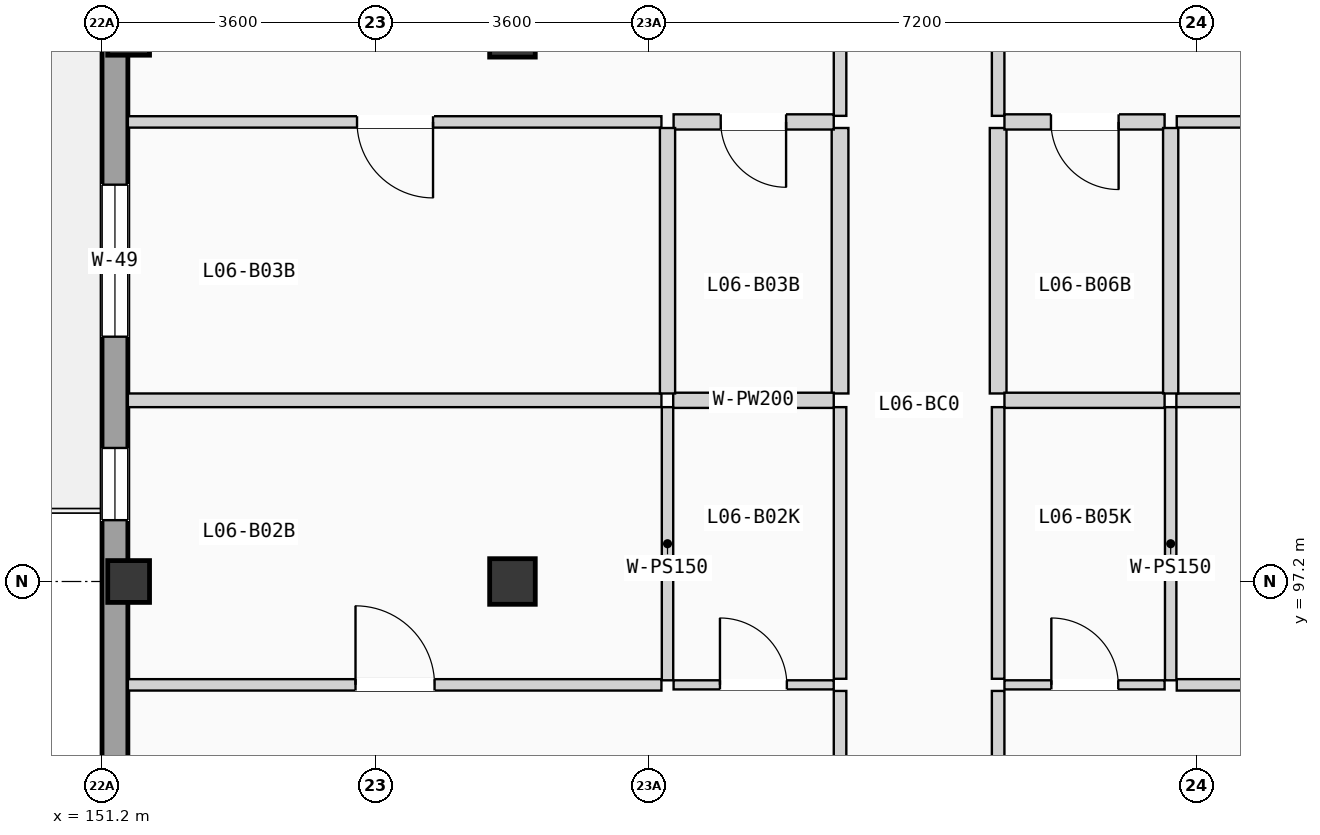
"""IFC4 building model, lengths in metres.
Left out: names, types, materials, properties, quantities, classifications, styles, units other than length and angle.
Written with IfcOpenShell. Run it as: python <this file> out.ifc"""

import sys

from ifc_helpers import new_model, si_unit, direction, frame, frame_2d, origin, origin_2d, place, context, subcontext, project, spatial, rectangle, extrude, element, fill, save


model = new_model("IFC4")
c1 = context("Model", 3, precision=1e-05, world=origin(), true_north=direction((0.0, 1.0)))
c2 = subcontext(c1, "Body", "Model", "MODEL_VIEW")
j1 = project(units=[si_unit("LENGTHUNIT", "METRE"), si_unit("PLANEANGLEUNIT", "RADIAN")], contexts=[c1])
p1 = place(None, origin())
s1 = spatial("IfcSite", under=j1, at=p1, CompositionType="ELEMENT")
p2 = place(p1, origin())
s2 = spatial("IfcBuilding", under=s1, at=p2, CompositionType="ELEMENT")
p3 = place(p2, frame((0.0, 0.0, 21.525)))
s3 = spatial("IfcBuildingStorey", under=s2, at=p3, CompositionType="ELEMENT", Elevation=21.525)
for number, where, z_axis, x_axis in (
    (1, (151.55, 97.2, 0.0), (0.0, 0.0, 1.0), (1.0, 0.0, 0.0)),
    (2, (151.55, 104.4, 0.0), (0.0, 0.0, 1.0), (1.0, 0.0, 0.0)),
):
    element("IfcColumn", number, at=place(p3, frame(where, z_axis=z_axis, x_axis=x_axis)), inside=s3, PredefinedType="COLUMN", context=c2, shape_type="SweptSolid", body=[
        extrude(rectangle(XDim=0.55, YDim=0.55, at=origin_2d()), origin(), (0.0, 0.0, 1.0), 3.15),
    ])
for number, where, z_axis, x_axis in (
    (3, (156.6, 97.2, 0.0), (0.0, 0.0, 1.0), (1.0, 0.0, 0.0)),
    (4, (156.6, 104.4, 0.0), (0.0, 0.0, 1.0), (1.0, 0.0, 0.0)),
):
    element("IfcColumn", number, at=place(p3, frame(where, z_axis=z_axis, x_axis=x_axis)), inside=s3, PredefinedType="COLUMN", context=c2, shape_type="SweptSolid", body=[
        extrude(rectangle(XDim=0.6, YDim=0.6, at=origin_2d()), origin(), (0.0, 0.0, 1.0), 3.15),
    ])
p4 = place(p3, frame((151.37, 68.74, 0.0), z_axis=(0.0, 0.0, 1.0), x_axis=(0.0, 1.0, 0.0)))
e5 = element("IfcWall", 5, at=p4, inside=s3, PredefinedType="SOLIDWALL", context=c2, shape_type="SweptSolid", body=[
    extrude(rectangle(XDim=49.72, YDim=0.34, at=frame_2d((24.86, 0.0))), origin(), (0.0, 0.0, 1.0), 2.89),
])
p5 = place(p4, frame((11.462, 0.0, 0.0)))
e6 = element("IfcOpeningElement", 6, at=p5, cuts=e5, PredefinedType="OPENING", context=c2, shape_type="SweptSolid", body=[
    extrude(rectangle(XDim=0.95, YDim=2.15, at=frame_2d((0.475, 1.075))), frame((0.0, 0.18, 0.0), z_axis=(0.0, -1.0, 0.0), x_axis=(1.0, 0.0, 0.0)), (0.0, 0.0, 1.0), 0.36),
])
p6 = place(p4, frame((8.082, 0.0, 0.555)))
e7 = element("IfcOpeningElement", 7, at=p6, cuts=e5, PredefinedType="OPENING", context=c2, shape_type="SweptSolid", body=[
    extrude(rectangle(XDim=1.85, YDim=1.65, at=frame_2d((0.925, 0.825))), frame((0.0, 0.18, 0.0), z_axis=(0.0, -1.0, 0.0), x_axis=(1.0, 0.0, 0.0)), (0.0, 0.0, 1.0), 0.36),
])
p7 = place(p4, frame((16.565, 0.0, 0.85)))
e8 = element("IfcOpeningElement", 8, at=p7, cuts=e5, PredefinedType="OPENING", context=c2, shape_type="SweptSolid", body=[
    extrude(rectangle(XDim=0.95, YDim=1.2, at=frame_2d((0.475, 0.6))), frame((0.0, 0.18, 0.0), z_axis=(0.0, -1.0, 0.0), x_axis=(1.0, 0.0, 0.0)), (0.0, 0.0, 1.0), 0.36),
])
p8 = place(p4, frame((23.86, 0.0, 0.9)))
e9 = element("IfcOpeningElement", 9, at=p8, cuts=e5, PredefinedType="OPENING", context=c2, shape_type="SweptSolid", body=[
    extrude(rectangle(XDim=2.0, YDim=1.2, at=frame_2d((1.0, 0.6))), frame((0.0, 0.18, 0.0), z_axis=(0.0, -1.0, 0.0), x_axis=(1.0, 0.0, 0.0)), (0.0, 0.0, 1.0), 0.36),
])
p9 = place(p4, frame((19.503, 0.0, 0.85)))
e10 = element("IfcOpeningElement", 10, at=p9, cuts=e5, PredefinedType="OPENING", context=c2, shape_type="SweptSolid", body=[
    extrude(rectangle(XDim=0.95, YDim=1.2, at=frame_2d((0.475, 0.6))), frame((0.0, 0.18, 0.0), z_axis=(0.0, -1.0, 0.0), x_axis=(1.0, 0.0, 0.0)), (0.0, 0.0, 1.0), 0.36),
])
p10 = place(p4, frame((29.267, 0.0, 0.85)))
e11 = element("IfcOpeningElement", 11, at=p10, cuts=e5, PredefinedType="OPENING", context=c2, shape_type="SweptSolid", body=[
    extrude(rectangle(XDim=0.95, YDim=1.2, at=frame_2d((0.475, 0.6))), frame((0.0, 0.18, 0.0), z_axis=(0.0, -1.0, 0.0), x_axis=(1.0, 0.0, 0.0)), (0.0, 0.0, 1.0), 0.36),
])
p11 = place(p4, frame((37.243, 0.0, 0.0)))
e12 = element("IfcOpeningElement", 12, at=p11, cuts=e5, PredefinedType="OPENING", context=c2, shape_type="SweptSolid", body=[
    extrude(rectangle(XDim=1.08, YDim=2.18, at=frame_2d((0.54, 1.09))), frame((0.0, 0.18, 0.0), z_axis=(0.0, -1.0, 0.0), x_axis=(1.0, 0.0, 0.0)), (0.0, 0.0, 1.0), 0.36),
])
p12 = place(p4, frame((31.681, 0.0, 0.555)))
e13 = element("IfcOpeningElement", 13, at=p12, cuts=e5, PredefinedType="OPENING", context=c2, shape_type="SweptSolid", body=[
    extrude(rectangle(XDim=2.0, YDim=1.65, at=frame_2d((1.0, 0.825))), frame((0.0, 0.18, 0.0), z_axis=(0.0, -1.0, 0.0), x_axis=(1.0, 0.0, 0.0)), (0.0, 0.0, 1.0), 0.36),
])
p13 = place(p4, frame((40.239, 0.0, 0.85)))
e14 = element("IfcOpeningElement", 14, at=p13, cuts=e5, PredefinedType="OPENING", context=c2, shape_type="SweptSolid", body=[
    extrude(rectangle(XDim=0.95, YDim=1.2, at=frame_2d((0.475, 0.6))), frame((0.0, 0.18, 0.0), z_axis=(0.0, -1.0, 0.0), x_axis=(1.0, 0.0, 0.0)), (0.0, 0.0, 1.0), 0.36),
])
p14 = place(p3, frame((160.91, 91.44, 0.0), z_axis=(0.0, 0.0, 1.0), x_axis=(0.0, 1.0, 0.0)))
e15 = element("IfcWall", 15, at=p14, inside=s3, PredefinedType="PARTITIONING", context=c2, shape_type="SweptSolid", body=[
    extrude(rectangle(XDim=4.32, YDim=0.165, at=frame_2d((2.16, 0.0))), origin(), (0.0, 0.0, 1.0), 2.87),
])
p15 = place(p14, frame((1.655, 0.0, 0.0)))
e16 = element("IfcOpeningElement", 16, at=p15, cuts=e15, PredefinedType="OPENING", context=c2, shape_type="SweptSolid", body=[
    extrude(rectangle(XDim=1.01, YDim=2.11, at=frame_2d((0.505, 1.055))), frame((0.0, 0.093, 0.0), z_axis=(0.0, -1.0, 0.0), x_axis=(1.0, 0.0, 0.0)), (0.0, 0.0, 1.0), 0.185),
])
p16 = place(p3, frame((160.91, 95.92, 0.0), z_axis=(0.0, 0.0, 1.0), x_axis=(0.0, 1.0, 0.0)))
e17 = element("IfcWall", 17, at=p16, inside=s3, PredefinedType="PARTITIONING", context=c2, shape_type="SweptSolid", body=[
    extrude(rectangle(XDim=3.574, YDim=0.165, at=frame_2d((1.787, 0.0))), origin(), (0.0, 0.0, 1.0), 2.87),
])
p17 = place(p3, frame((160.91, 103.327, 0.0), z_axis=(0.0, 0.0, 1.0), x_axis=(0.0, 1.0, 0.0)))
e18 = element("IfcWall", 18, at=p17, inside=s3, PredefinedType="PARTITIONING", context=c2, shape_type="SweptSolid", body=[
    extrude(rectangle(XDim=4.22, YDim=0.165, at=frame_2d((2.11, 0.0))), origin(), (0.0, 0.0, 1.0), 2.87),
])
p18 = place(p17, frame((1.605, 0.0, 0.0)))
e19 = element("IfcOpeningElement", 19, at=p18, cuts=e18, PredefinedType="OPENING", context=c2, shape_type="SweptSolid", body=[
    extrude(rectangle(XDim=1.01, YDim=2.11, at=frame_2d((0.505, 1.055))), frame((0.0, 0.093, 0.0), z_axis=(0.0, -1.0, 0.0), x_axis=(1.0, 0.0, 0.0)), (0.0, 0.0, 1.0), 0.185),
])
p19 = place(p3, frame((160.91, 99.674, 0.0), z_axis=(0.0, 0.0, 1.0), x_axis=(0.0, 1.0, 0.0)))
e20 = element("IfcWall", 20, at=p19, inside=s3, PredefinedType="PLUMBINGWALL", context=c2, shape_type="SweptSolid", body=[
    extrude(rectangle(XDim=3.493, YDim=0.22, at=frame_2d((1.747, 0.0))), origin(), (0.0, 0.0, 1.0), 2.87),
])
p20 = place(p3, frame((162.99, 91.44, 0.0), z_axis=(0.0, 0.0, 1.0), x_axis=(0.0, 1.0, 0.0)))
e21 = element("IfcWall", 21, at=p20, inside=s3, PredefinedType="PARTITIONING", context=c2, shape_type="SweptSolid", body=[
    extrude(rectangle(XDim=4.32, YDim=0.165, at=frame_2d((2.16, 0.0))), origin(), (0.0, 0.0, 1.0), 2.87),
])
p21 = place(p20, frame((1.655, 0.0, 0.0)))
e22 = element("IfcOpeningElement", 22, at=p21, cuts=e21, PredefinedType="OPENING", context=c2, shape_type="SweptSolid", body=[
    extrude(rectangle(XDim=1.01, YDim=2.11, at=frame_2d((0.505, 1.055))), frame((0.0, 0.093, 0.0), z_axis=(0.0, -1.0, 0.0), x_axis=(1.0, 0.0, 0.0)), (0.0, 0.0, 1.0), 0.185),
])
p22 = place(p3, frame((162.99, 95.92, 0.0), z_axis=(0.0, 0.0, 1.0), x_axis=(0.0, 1.0, 0.0)))
e23 = element("IfcWall", 23, at=p22, inside=s3, PredefinedType="PARTITIONING", context=c2, shape_type="SweptSolid", body=[
    extrude(rectangle(XDim=3.574, YDim=0.165, at=frame_2d((1.787, 0.0))), origin(), (0.0, 0.0, 1.0), 2.87),
])
p23 = place(p3, frame((162.99, 103.327, 0.0), z_axis=(0.0, 0.0, 1.0), x_axis=(0.0, 1.0, 0.0)))
e24 = element("IfcWall", 24, at=p23, inside=s3, PredefinedType="PARTITIONING", context=c2, shape_type="SweptSolid", body=[
    extrude(rectangle(XDim=4.22, YDim=0.165, at=frame_2d((2.11, 0.0))), origin(), (0.0, 0.0, 1.0), 2.87),
])
p24 = place(p23, frame((1.605, 0.0, 0.0)))
e25 = element("IfcOpeningElement", 25, at=p24, cuts=e24, PredefinedType="OPENING", context=c2, shape_type="SweptSolid", body=[
    extrude(rectangle(XDim=1.01, YDim=2.11, at=frame_2d((0.505, 1.055))), frame((0.0, 0.093, 0.0), z_axis=(0.0, -1.0, 0.0), x_axis=(1.0, 0.0, 0.0)), (0.0, 0.0, 1.0), 0.185),
])
p25 = place(p3, frame((162.99, 99.674, 0.0), z_axis=(0.0, 0.0, 1.0), x_axis=(0.0, 1.0, 0.0)))
e26 = element("IfcWall", 26, at=p25, inside=s3, PredefinedType="PLUMBINGWALL", context=c2, shape_type="SweptSolid", body=[
    extrude(rectangle(XDim=3.493, YDim=0.22, at=frame_2d((1.747, 0.0))), origin(), (0.0, 0.0, 1.0), 2.87),
])
p26 = place(p3, frame((158.72, 95.84, 0.0), z_axis=(0.0, 0.0, 1.0), x_axis=(1.0, 0.0, 0.0)))
e27 = element("IfcWall", 27, at=p26, inside=s3, PredefinedType="PARTITIONING", context=c2, shape_type="SweptSolid", body=[
    extrude(rectangle(XDim=2.107, YDim=0.12, at=frame_2d((1.053, 0.0))), origin(), (0.0, 0.0, 1.0), 2.87),
])
p27 = place(p26, frame((0.61, 0.0, 0.0)))
e28 = element("IfcOpeningElement", 28, at=p27, cuts=e27, PredefinedType="OPENING", context=c2, shape_type="SweptSolid", body=[
    extrude(rectangle(XDim=0.88, YDim=2.02, at=frame_2d((0.44, 1.01))), frame((0.0, 0.07, 0.0), z_axis=(0.0, -1.0, 0.0), x_axis=(1.0, 0.0, 0.0)), (0.0, 0.0, 1.0), 0.14),
])
p28 = place(p3, frame((151.54, 95.84, 0.0), z_axis=(0.0, 0.0, 1.0), x_axis=(1.0, 0.0, 0.0)))
e29 = element("IfcWall", 29, at=p28, inside=s3, PredefinedType="PARTITIONING", context=c2, shape_type="SweptSolid", body=[
    extrude(rectangle(XDim=7.02, YDim=0.15, at=frame_2d((3.51, 0.0))), origin(), (0.0, 0.0, 1.0), 2.87),
])
p29 = place(p28, frame((2.995, 0.0, 0.0)))
e30 = element("IfcOpeningElement", 30, at=p29, cuts=e29, PredefinedType="OPENING", context=c2, shape_type="SweptSolid", body=[
    extrude(rectangle(XDim=1.04, YDim=2.08, at=frame_2d((0.52, 1.04))), frame((0.0, 0.085, 0.0), z_axis=(0.0, -1.0, 0.0), x_axis=(1.0, 0.0, 0.0)), (0.0, 0.0, 1.0), 0.17),
])
p30 = place(p3, frame((158.64, 95.9, 0.0), z_axis=(0.0, 0.0, 1.0), x_axis=(0.0, 1.0, 0.0)))
e31 = element("IfcWall", 31, at=p30, inside=s3, PredefinedType="PARTITIONING", context=c2, shape_type="SweptSolid", body=[
    extrude(rectangle(XDim=3.594, YDim=0.15, at=frame_2d((1.797, 0.0))), origin(), (0.0, 0.0, 1.0), 2.87),
])
p31 = place(p3, frame((158.715, 99.584, 0.0), z_axis=(0.0, 0.0, 1.0), x_axis=(1.0, 0.0, 0.0)))
e32 = element("IfcWall", 32, at=p31, inside=s3, PredefinedType="PLUMBINGWALL", context=c2, shape_type="SweptSolid", body=[
    extrude(rectangle(XDim=2.112, YDim=0.2, at=frame_2d((1.056, 0.0))), origin(), (0.0, 0.0, 1.0), 2.87),
])
p32 = place(p3, frame((151.54, 99.584, 0.0), z_axis=(0.0, 0.0, 1.0), x_axis=(1.0, 0.0, 0.0)))
e33 = element("IfcWall", 33, at=p32, inside=s3, PredefinedType="PARTITIONING", context=c2, shape_type="SweptSolid", body=[
    extrude(rectangle(XDim=7.02, YDim=0.18, at=frame_2d((3.51, 0.0))), origin(), (0.0, 0.0, 1.0), 2.87),
])
p33 = place(p3, frame((158.72, 103.247, 0.0), z_axis=(0.0, 0.0, 1.0), x_axis=(1.0, 0.0, 0.0)))
e34 = element("IfcWall", 34, at=p33, inside=s3, PredefinedType="PLUMBINGWALL", context=c2, shape_type="SweptSolid", body=[
    extrude(rectangle(XDim=2.107, YDim=0.2, at=frame_2d((1.053, 0.0))), origin(), (0.0, 0.0, 1.0), 2.87),
])
p34 = place(p33, frame((0.62, 0.0, 0.0)))
e35 = element("IfcOpeningElement", 35, at=p34, cuts=e34, PredefinedType="OPENING", context=c2, shape_type="SweptSolid", body=[
    extrude(rectangle(XDim=0.86, YDim=2.0, at=frame_2d((0.43, 1.0))), frame((0.0, 0.11, 0.0), z_axis=(0.0, -1.0, 0.0), x_axis=(1.0, 0.0, 0.0)), (0.0, 0.0, 1.0), 0.22),
])
p35 = place(p3, frame((151.54, 103.247, 0.0), z_axis=(0.0, 0.0, 1.0), x_axis=(1.0, 0.0, 0.0)))
e36 = element("IfcWall", 36, at=p35, inside=s3, PredefinedType="PARTITIONING", context=c2, shape_type="SweptSolid", body=[
    extrude(rectangle(XDim=7.02, YDim=0.15, at=frame_2d((3.51, 0.0))), origin(), (0.0, 0.0, 1.0), 2.87),
])
p36 = place(p35, frame((3.015, 0.0, 0.0)))
e37 = element("IfcOpeningElement", 37, at=p36, cuts=e36, PredefinedType="OPENING", context=c2, shape_type="SweptSolid", body=[
    extrude(rectangle(XDim=1.0, YDim=2.06, at=frame_2d((0.5, 1.03))), frame((0.0, 0.085, 0.0), z_axis=(0.0, -1.0, 0.0), x_axis=(1.0, 0.0, 0.0)), (0.0, 0.0, 1.0), 0.17),
])
p37 = place(p3, frame((158.64, 99.674, 0.0), z_axis=(0.0, 0.0, 1.0), x_axis=(0.0, 1.0, 0.0)))
e38 = element("IfcWall", 38, at=p37, inside=s3, PredefinedType="PLUMBINGWALL", context=c2, shape_type="SweptSolid", body=[
    extrude(rectangle(XDim=3.493, YDim=0.2, at=frame_2d((1.747, 0.0))), origin(), (0.0, 0.0, 1.0), 2.87),
])
p38 = place(p3, frame((163.073, 95.84, 0.0), z_axis=(0.0, 0.0, 1.0), x_axis=(1.0, 0.0, 0.0)))
e39 = element("IfcWall", 39, at=p38, inside=s3, PredefinedType="PARTITIONING", context=c2, shape_type="SweptSolid", body=[
    extrude(rectangle(XDim=2.107, YDim=0.12, at=frame_2d((1.053, 0.0))), origin(), (0.0, 0.0, 1.0), 2.87),
])
p39 = place(p38, frame((0.617, 0.0, 0.0)))
e40 = element("IfcOpeningElement", 40, at=p39, cuts=e39, PredefinedType="OPENING", context=c2, shape_type="SweptSolid", body=[
    extrude(rectangle(XDim=0.88, YDim=2.02, at=frame_2d((0.44, 1.01))), frame((0.0, 0.07, 0.0), z_axis=(0.0, -1.0, 0.0), x_axis=(1.0, 0.0, 0.0)), (0.0, 0.0, 1.0), 0.14),
])
p40 = place(p3, frame((165.34, 95.84, 0.0), z_axis=(0.0, 0.0, 1.0), x_axis=(1.0, 0.0, 0.0)))
e41 = element("IfcWall", 41, at=p40, inside=s3, PredefinedType="PARTITIONING", context=c2, shape_type="SweptSolid", body=[
    extrude(rectangle(XDim=7.12, YDim=0.15, at=frame_2d((3.56, 0.0))), origin(), (0.0, 0.0, 1.0), 2.87),
])
p41 = place(p40, frame((3.035, 0.0, 0.0)))
e42 = element("IfcOpeningElement", 42, at=p41, cuts=e41, PredefinedType="OPENING", context=c2, shape_type="SweptSolid", body=[
    extrude(rectangle(XDim=1.04, YDim=2.08, at=frame_2d((0.52, 1.04))), frame((0.0, 0.085, 0.0), z_axis=(0.0, -1.0, 0.0), x_axis=(1.0, 0.0, 0.0)), (0.0, 0.0, 1.0), 0.17),
])
p42 = place(p3, frame((165.26, 95.9, 0.0), z_axis=(0.0, 0.0, 1.0), x_axis=(0.0, 1.0, 0.0)))
e43 = element("IfcWall", 43, at=p42, inside=s3, PredefinedType="PARTITIONING", context=c2, shape_type="SweptSolid", body=[
    extrude(rectangle(XDim=3.594, YDim=0.15, at=frame_2d((1.797, 0.0))), origin(), (0.0, 0.0, 1.0), 2.87),
])
p43 = place(p3, frame((163.073, 99.584, 0.0), z_axis=(0.0, 0.0, 1.0), x_axis=(1.0, 0.0, 0.0)))
e44 = element("IfcWall", 44, at=p43, inside=s3, PredefinedType="PLUMBINGWALL", context=c2, shape_type="SweptSolid", body=[
    extrude(rectangle(XDim=2.107, YDim=0.2, at=frame_2d((1.053, 0.0))), origin(), (0.0, 0.0, 1.0), 2.87),
])
p44 = place(p3, frame((165.335, 99.584, 0.0), z_axis=(0.0, 0.0, 1.0), x_axis=(1.0, 0.0, 0.0)))
e45 = element("IfcWall", 45, at=p44, inside=s3, PredefinedType="PARTITIONING", context=c2, shape_type="SweptSolid", body=[
    extrude(rectangle(XDim=7.125, YDim=0.18, at=frame_2d((3.562, 0.0))), origin(), (0.0, 0.0, 1.0), 2.87),
])
p45 = place(p3, frame((163.073, 103.247, 0.0), z_axis=(0.0, 0.0, 1.0), x_axis=(1.0, 0.0, 0.0)))
e46 = element("IfcWall", 46, at=p45, inside=s3, PredefinedType="PLUMBINGWALL", context=c2, shape_type="SweptSolid", body=[
    extrude(rectangle(XDim=2.107, YDim=0.2, at=frame_2d((1.053, 0.0))), origin(), (0.0, 0.0, 1.0), 2.87),
])
p46 = place(p45, frame((0.612, 0.0, 0.0)))
e47 = element("IfcOpeningElement", 47, at=p46, cuts=e46, PredefinedType="OPENING", context=c2, shape_type="SweptSolid", body=[
    extrude(rectangle(XDim=0.89, YDim=2.03, at=frame_2d((0.445, 1.015))), frame((0.0, 0.11, 0.0), z_axis=(0.0, -1.0, 0.0), x_axis=(1.0, 0.0, 0.0)), (0.0, 0.0, 1.0), 0.22),
])
p47 = place(p3, frame((165.34, 103.247, 0.0), z_axis=(0.0, 0.0, 1.0), x_axis=(1.0, 0.0, 0.0)))
e48 = element("IfcWall", 48, at=p47, inside=s3, PredefinedType="PARTITIONING", context=c2, shape_type="SweptSolid", body=[
    extrude(rectangle(XDim=7.12, YDim=0.15, at=frame_2d((3.56, 0.0))), origin(), (0.0, 0.0, 1.0), 2.87),
])
p48 = place(p47, frame((3.055, 0.0, 0.0)))
e49 = element("IfcOpeningElement", 49, at=p48, cuts=e48, PredefinedType="OPENING", context=c2, shape_type="SweptSolid", body=[
    extrude(rectangle(XDim=1.0, YDim=2.06, at=frame_2d((0.5, 1.03))), frame((0.0, 0.085, 0.0), z_axis=(0.0, -1.0, 0.0), x_axis=(1.0, 0.0, 0.0)), (0.0, 0.0, 1.0), 0.17),
])
p49 = place(p3, frame((165.26, 99.674, 0.0), z_axis=(0.0, 0.0, 1.0), x_axis=(0.0, 1.0, 0.0)))
e50 = element("IfcWall", 50, at=p49, inside=s3, PredefinedType="PLUMBINGWALL", context=c2, shape_type="SweptSolid", body=[
    extrude(rectangle(XDim=3.493, YDim=0.2, at=frame_2d((1.747, 0.0))), origin(), (0.0, 0.0, 1.0), 2.87),
])
p50 = place(p10, origin())
e51 = element("IfcWindow", 51, at=p50, inside=s3, PartitioningType="SINGLE_PANEL", PredefinedType="WINDOW", context=c2, shape_type="SweptSolid", body=[
    extrude(rectangle(XDim=0.95, YDim=1.2, at=frame_2d((0.475, 0.6))), frame((0.0, 0.03, 0.0), z_axis=(0.0, -1.0, 0.0), x_axis=(1.0, 0.0, 0.0)), (0.0, 0.0, 1.0), 0.06),
])
fill(e11, e51)
p51 = place(p12, origin())
e52 = element("IfcWindow", 52, at=p51, inside=s3, PartitioningType="DOUBLE_PANEL_VERTICAL", PredefinedType="WINDOW", context=c2, shape_type="SweptSolid", body=[
    extrude(rectangle(XDim=2.0, YDim=1.65, at=frame_2d((1.0, 0.825))), frame((0.0, 0.03, 0.0), z_axis=(0.0, -1.0, 0.0), x_axis=(1.0, 0.0, 0.0)), (0.0, 0.0, 1.0), 0.06),
])
fill(e13, e52)
p52 = place(p27, origin())
e53 = element("IfcDoor", 53, at=p52, inside=s3, OperationType="SINGLE_SWING_LEFT", PredefinedType="DOOR", context=c2, shape_type="SweptSolid", body=[
    extrude(rectangle(XDim=0.88, YDim=2.02, at=frame_2d((0.44, 1.01))), frame((0.0, 0.025, 0.0), z_axis=(0.0, -1.0, 0.0), x_axis=(1.0, 0.0, 0.0)), (0.0, 0.0, 1.0), 0.05),
])
fill(e28, e53)
p53 = place(p29, origin())
e54 = element("IfcDoor", 54, at=p53, inside=s3, OperationType="SINGLE_SWING_LEFT", PredefinedType="DOOR", context=c2, shape_type="SweptSolid", body=[
    extrude(rectangle(XDim=1.04, YDim=2.08, at=frame_2d((0.52, 1.04))), frame((0.0, 0.025, 0.0), z_axis=(0.0, -1.0, 0.0), x_axis=(1.0, 0.0, 0.0)), (0.0, 0.0, 1.0), 0.05),
])
fill(e30, e54)
p54 = place(p34, frame((0.86, 0.0, 0.0), z_axis=(0.0, 0.0, 1.0), x_axis=(-1.0, 0.0, 0.0)))
e55 = element("IfcDoor", 55, at=p54, inside=s3, OperationType="SINGLE_SWING_RIGHT", PredefinedType="DOOR", context=c2, shape_type="SweptSolid", body=[
    extrude(rectangle(XDim=0.86, YDim=2.0, at=frame_2d((0.43, 1.0))), frame((0.0, 0.025, 0.0), z_axis=(0.0, -1.0, 0.0), x_axis=(1.0, 0.0, 0.0)), (0.0, 0.0, 1.0), 0.05),
])
fill(e35, e55)
p55 = place(p36, frame((1.0, 0.0, 0.0), z_axis=(0.0, 0.0, 1.0), x_axis=(-1.0, 0.0, 0.0)))
e56 = element("IfcDoor", 56, at=p55, inside=s3, OperationType="SINGLE_SWING_RIGHT", PredefinedType="DOOR", context=c2, shape_type="SweptSolid", body=[
    extrude(rectangle(XDim=1.0, YDim=2.06, at=frame_2d((0.5, 1.03))), frame((0.0, 0.025, 0.0), z_axis=(0.0, -1.0, 0.0), x_axis=(1.0, 0.0, 0.0)), (0.0, 0.0, 1.0), 0.05),
])
fill(e37, e56)
p56 = place(p39, origin())
e57 = element("IfcDoor", 57, at=p56, inside=s3, OperationType="SINGLE_SWING_LEFT", PredefinedType="DOOR", context=c2, shape_type="SweptSolid", body=[
    extrude(rectangle(XDim=0.88, YDim=2.02, at=frame_2d((0.44, 1.01))), frame((0.0, 0.025, 0.0), z_axis=(0.0, -1.0, 0.0), x_axis=(1.0, 0.0, 0.0)), (0.0, 0.0, 1.0), 0.05),
])
fill(e40, e57)
p57 = place(p46, frame((0.89, 0.0, 0.0), z_axis=(0.0, 0.0, 1.0), x_axis=(-1.0, 0.0, 0.0)))
e58 = element("IfcDoor", 58, at=p57, inside=s3, OperationType="SINGLE_SWING_RIGHT", PredefinedType="DOOR", context=c2, shape_type="SweptSolid", body=[
    extrude(rectangle(XDim=0.89, YDim=2.03, at=frame_2d((0.445, 1.015))), frame((0.0, 0.025, 0.0), z_axis=(0.0, -1.0, 0.0), x_axis=(1.0, 0.0, 0.0)), (0.0, 0.0, 1.0), 0.05),
])
fill(e47, e58)
save(model, sys.argv[1])
